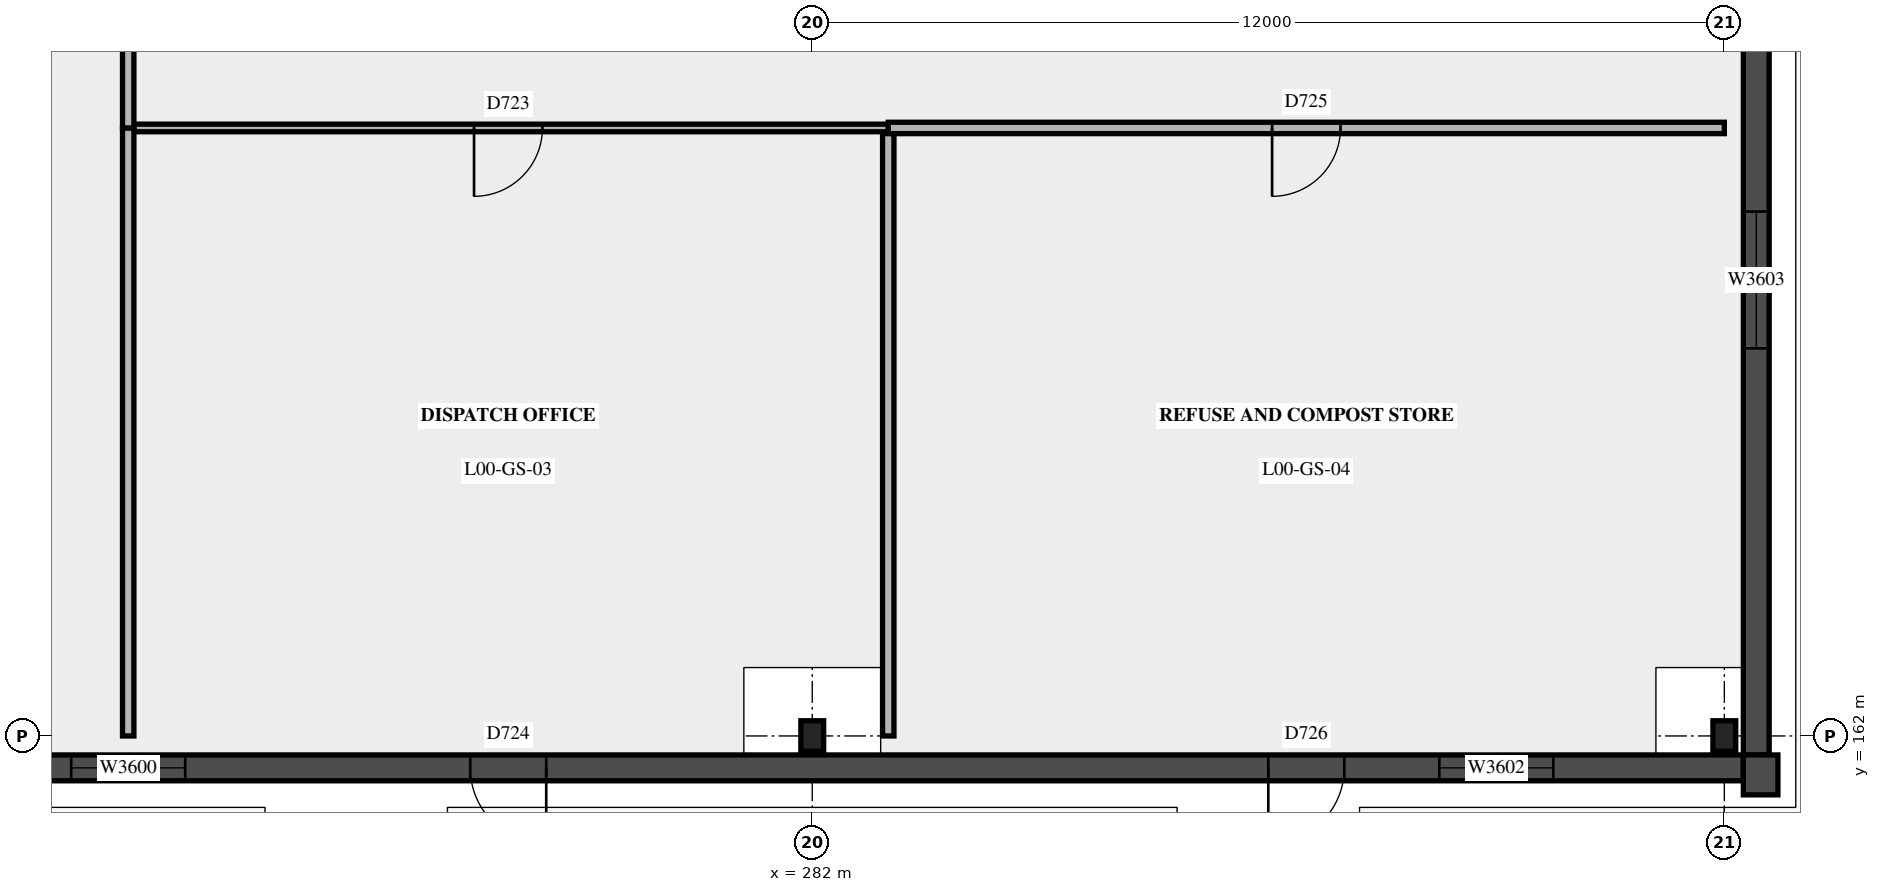
"""IFC4 building model, lengths in metres.
Left out: names, types, materials, properties, quantities, classifications, styles, units other than length and angle.
Written with IfcOpenShell. Run it as: python <this file> out.ifc"""

import sys

from ifc_helpers import new_model, si_unit, direction, frame, frame_2d, origin, origin_2d, place, context, subcontext, project, spatial, polyline, rectangle, i_section, outline, extrude, element, fill, save


model = new_model("IFC4")
c1 = context("Model", 3, precision=1e-05, world=origin(), true_north=direction((0.0, 1.0)))
c2 = subcontext(c1, "Body", "Model", "MODEL_VIEW")
j1 = project(units=[si_unit("LENGTHUNIT", "METRE"), si_unit("PLANEANGLEUNIT", "RADIAN")], contexts=[c1])
p1 = place(None, origin())
s1 = spatial("IfcSite", under=j1, at=p1, CompositionType="ELEMENT")
p2 = place(p1, origin())
s2 = spatial("IfcBuilding", under=s1, at=p2, CompositionType="ELEMENT")
p3 = place(p2, origin())
s3 = spatial("IfcBuildingStorey", under=s2, at=p3, CompositionType="ELEMENT", Elevation=0.0)
for number, where, z_axis, x_axis in (
    (1, (282.0, 162.0, 0.0), (0.0, 0.0, 1.0), (1.0, 0.0, 0.0)),
    (2, (294.0, 162.0, 0.0), (0.0, 0.0, 1.0), (1.0, 0.0, 0.0)),
):
    element("IfcColumn", number, at=place(p3, frame(where, z_axis=z_axis, x_axis=x_axis)), inside=s3, PredefinedType="COLUMN", context=c2, shape_type="SweptSolid", body=[
        extrude(i_section(OverallWidth=0.3, OverallDepth=0.4, WebThickness=0.013, FlangeThickness=0.024, at=origin_2d()), origin(), (0.0, 0.0, 1.0), 5.4),
    ])
p4 = place(p3, frame((221.75, 161.58, 0.0), z_axis=(0.0, 0.0, 1.0), x_axis=(1.0, 0.0, 0.0)))
e3 = element("IfcWall", 3, at=p4, inside=s3, PredefinedType="SOLIDWALL", context=c2, shape_type="SweptSolid", body=[
    extrude(rectangle(XDim=72.5, YDim=0.34, at=frame_2d((36.25, 0.0))), origin(), (0.0, 0.0, 1.0), 5.4),
])
p5 = place(p4, frame((0.155, 0.0, 4.61)))
e4 = element("IfcOpeningElement", 4, at=p5, cuts=e3, PredefinedType="OPENING", context=c2, shape_type="SweptSolid", body=[
    extrude(rectangle(XDim=0.19, YDim=0.38, at=frame_2d((0.095, 0.19))), frame((0.0, 0.18, 0.0), z_axis=(0.0, -1.0, 0.0), x_axis=(1.0, 0.0, 0.0)), (0.0, 0.0, 1.0), 0.36),
])
p6 = place(p4, frame((6.155, 0.0, 4.61)))
e5 = element("IfcOpeningElement", 5, at=p6, cuts=e3, PredefinedType="OPENING", context=c2, shape_type="SweptSolid", body=[
    extrude(rectangle(XDim=0.19, YDim=0.38, at=frame_2d((0.095, 0.19))), frame((0.0, 0.18, 0.0), z_axis=(0.0, -1.0, 0.0), x_axis=(1.0, 0.0, 0.0)), (0.0, 0.0, 1.0), 0.36),
])
p7 = place(p4, frame((12.155, 0.0, 4.61)))
e6 = element("IfcOpeningElement", 6, at=p7, cuts=e3, PredefinedType="OPENING", context=c2, shape_type="SweptSolid", body=[
    extrude(rectangle(XDim=0.19, YDim=0.38, at=frame_2d((0.095, 0.19))), frame((0.0, 0.18, 0.0), z_axis=(0.0, -1.0, 0.0), x_axis=(1.0, 0.0, 0.0)), (0.0, 0.0, 1.0), 0.36),
])
p8 = place(p4, frame((18.155, 0.0, 4.61)))
e7 = element("IfcOpeningElement", 7, at=p8, cuts=e3, PredefinedType="OPENING", context=c2, shape_type="SweptSolid", body=[
    extrude(rectangle(XDim=0.19, YDim=0.38, at=frame_2d((0.095, 0.19))), frame((0.0, 0.18, 0.0), z_axis=(0.0, -1.0, 0.0), x_axis=(1.0, 0.0, 0.0)), (0.0, 0.0, 1.0), 0.36),
])
p9 = place(p4, frame((24.155, 0.0, 4.61)))
e8 = element("IfcOpeningElement", 8, at=p9, cuts=e3, PredefinedType="OPENING", context=c2, shape_type="SweptSolid", body=[
    extrude(rectangle(XDim=0.19, YDim=0.38, at=frame_2d((0.095, 0.19))), frame((0.0, 0.18, 0.0), z_axis=(0.0, -1.0, 0.0), x_axis=(1.0, 0.0, 0.0)), (0.0, 0.0, 1.0), 0.36),
])
p10 = place(p4, frame((30.155, 0.0, 4.61)))
e9 = element("IfcOpeningElement", 9, at=p10, cuts=e3, PredefinedType="OPENING", context=c2, shape_type="SweptSolid", body=[
    extrude(rectangle(XDim=0.19, YDim=0.38, at=frame_2d((0.095, 0.19))), frame((0.0, 0.18, 0.0), z_axis=(0.0, -1.0, 0.0), x_axis=(1.0, 0.0, 0.0)), (0.0, 0.0, 1.0), 0.36),
])
p11 = place(p4, frame((36.155, 0.0, 4.61)))
e10 = element("IfcOpeningElement", 10, at=p11, cuts=e3, PredefinedType="OPENING", context=c2, shape_type="SweptSolid", body=[
    extrude(rectangle(XDim=0.19, YDim=0.38, at=frame_2d((0.095, 0.19))), frame((0.0, 0.18, 0.0), z_axis=(0.0, -1.0, 0.0), x_axis=(1.0, 0.0, 0.0)), (0.0, 0.0, 1.0), 0.36),
])
p12 = place(p4, frame((42.155, 0.0, 4.61)))
e11 = element("IfcOpeningElement", 11, at=p12, cuts=e3, PredefinedType="OPENING", context=c2, shape_type="SweptSolid", body=[
    extrude(rectangle(XDim=0.19, YDim=0.38, at=frame_2d((0.095, 0.19))), frame((0.0, 0.18, 0.0), z_axis=(0.0, -1.0, 0.0), x_axis=(1.0, 0.0, 0.0)), (0.0, 0.0, 1.0), 0.36),
])
p13 = place(p4, frame((48.155, 0.0, 4.61)))
e12 = element("IfcOpeningElement", 12, at=p13, cuts=e3, PredefinedType="OPENING", context=c2, shape_type="SweptSolid", body=[
    extrude(rectangle(XDim=0.19, YDim=0.38, at=frame_2d((0.095, 0.19))), frame((0.0, 0.18, 0.0), z_axis=(0.0, -1.0, 0.0), x_axis=(1.0, 0.0, 0.0)), (0.0, 0.0, 1.0), 0.36),
])
p14 = place(p4, frame((54.155, 0.0, 4.61)))
e13 = element("IfcOpeningElement", 13, at=p14, cuts=e3, PredefinedType="OPENING", context=c2, shape_type="SweptSolid", body=[
    extrude(rectangle(XDim=0.19, YDim=0.38, at=frame_2d((0.095, 0.19))), frame((0.0, 0.18, 0.0), z_axis=(0.0, -1.0, 0.0), x_axis=(1.0, 0.0, 0.0)), (0.0, 0.0, 1.0), 0.36),
])
p15 = place(p4, frame((60.155, 0.0, 4.61)))
e14 = element("IfcOpeningElement", 14, at=p15, cuts=e3, PredefinedType="OPENING", context=c2, shape_type="SweptSolid", body=[
    extrude(rectangle(XDim=0.19, YDim=0.38, at=frame_2d((0.095, 0.19))), frame((0.0, 0.18, 0.0), z_axis=(0.0, -1.0, 0.0), x_axis=(1.0, 0.0, 0.0)), (0.0, 0.0, 1.0), 0.36),
])
p16 = place(p4, frame((66.155, 0.0, 4.61)))
e15 = element("IfcOpeningElement", 15, at=p16, cuts=e3, PredefinedType="OPENING", context=c2, shape_type="SweptSolid", body=[
    extrude(rectangle(XDim=0.19, YDim=0.38, at=frame_2d((0.095, 0.19))), frame((0.0, 0.18, 0.0), z_axis=(0.0, -1.0, 0.0), x_axis=(1.0, 0.0, 0.0)), (0.0, 0.0, 1.0), 0.36),
])
p17 = place(p4, frame((72.155, 0.0, 4.61)))
e16 = element("IfcOpeningElement", 16, at=p17, cuts=e3, PredefinedType="OPENING", context=c2, shape_type="SweptSolid", body=[
    extrude(rectangle(XDim=0.19, YDim=0.38, at=frame_2d((0.095, 0.19))), frame((0.0, 0.18, 0.0), z_axis=(0.0, -1.0, 0.0), x_axis=(1.0, 0.0, 0.0)), (0.0, 0.0, 1.0), 0.36),
])
p18 = place(p4, frame((4.25, 0.0, 0.0)))
e17 = element("IfcOpeningElement", 17, at=p18, cuts=e3, PredefinedType="OPENING", context=c2, shape_type="SweptSolid", body=[
    extrude(rectangle(XDim=4.0, YDim=4.2, at=frame_2d((2.0, 2.1))), frame((0.0, 0.18, 0.0), z_axis=(0.0, -1.0, 0.0), x_axis=(1.0, 0.0, 0.0)), (0.0, 0.0, 1.0), 0.36),
])
p19 = place(p4, frame((16.25, 0.0, 0.0)))
e18 = element("IfcOpeningElement", 18, at=p19, cuts=e3, PredefinedType="OPENING", context=c2, shape_type="SweptSolid", body=[
    extrude(rectangle(XDim=4.0, YDim=4.2, at=frame_2d((2.0, 2.1))), frame((0.0, 0.18, 0.0), z_axis=(0.0, -1.0, 0.0), x_axis=(1.0, 0.0, 0.0)), (0.0, 0.0, 1.0), 0.36),
])
p20 = place(p4, frame((23.75, 0.0, 0.0), z_axis=(0.0, 0.0, 1.0), x_axis=(-1.0, 0.0, 0.0)))
e19 = element("IfcOpeningElement", 19, at=p20, cuts=e3, PredefinedType="OPENING", context=c2, shape_type="SweptSolid", body=[
    extrude(rectangle(XDim=1.0, YDim=2.1, at=frame_2d((0.5, 1.05))), frame((0.0, 0.18, 0.0), z_axis=(0.0, -1.0, 0.0), x_axis=(1.0, 0.0, 0.0)), (0.0, 0.0, 1.0), 0.36),
])
p21 = place(p4, frame((28.25, 0.0, 0.0)))
e20 = element("IfcOpeningElement", 20, at=p21, cuts=e3, PredefinedType="OPENING", context=c2, shape_type="SweptSolid", body=[
    extrude(rectangle(XDim=4.0, YDim=4.2, at=frame_2d((2.0, 2.1))), frame((0.0, 0.18, 0.0), z_axis=(0.0, -1.0, 0.0), x_axis=(1.0, 0.0, 0.0)), (0.0, 0.0, 1.0), 0.36),
])
p22 = place(p4, frame((40.25, 0.0, 0.0)))
e21 = element("IfcOpeningElement", 21, at=p22, cuts=e3, PredefinedType="OPENING", context=c2, shape_type="SweptSolid", body=[
    extrude(rectangle(XDim=4.0, YDim=4.2, at=frame_2d((2.0, 2.1))), frame((0.0, 0.18, 0.0), z_axis=(0.0, -1.0, 0.0), x_axis=(1.0, 0.0, 0.0)), (0.0, 0.0, 1.0), 0.36),
])
p23 = place(p4, frame((56.75, 0.0, 0.0), z_axis=(0.0, 0.0, 1.0), x_axis=(-1.0, 0.0, 0.0)))
e22 = element("IfcOpeningElement", 22, at=p23, cuts=e3, PredefinedType="OPENING", context=c2, shape_type="SweptSolid", body=[
    extrude(rectangle(XDim=1.0, YDim=2.1, at=frame_2d((0.5, 1.05))), frame((0.0, 0.18, 0.0), z_axis=(0.0, -1.0, 0.0), x_axis=(1.0, 0.0, 0.0)), (0.0, 0.0, 1.0), 0.36),
])
p24 = place(p4, frame((67.25, 0.0, 0.0), z_axis=(0.0, 0.0, 1.0), x_axis=(-1.0, 0.0, 0.0)))
e23 = element("IfcOpeningElement", 23, at=p24, cuts=e3, PredefinedType="OPENING", context=c2, shape_type="SweptSolid", body=[
    extrude(rectangle(XDim=1.0, YDim=2.1, at=frame_2d((0.5, 1.05))), frame((0.0, 0.18, 0.0), z_axis=(0.0, -1.0, 0.0), x_axis=(1.0, 0.0, 0.0)), (0.0, 0.0, 1.0), 0.36),
])
p25 = place(p4, frame((50.5, 0.0, 3.6)))
e24 = element("IfcOpeningElement", 24, at=p25, cuts=e3, PredefinedType="OPENING", context=c2, shape_type="SweptSolid", body=[
    extrude(rectangle(XDim=1.5, YDim=1.2, at=frame_2d((0.75, 0.6))), frame((0.0, 0.18, 0.0), z_axis=(0.0, -1.0, 0.0), x_axis=(1.0, 0.0, 0.0)), (0.0, 0.0, 1.0), 0.36),
])
p26 = place(p4, frame((68.5, 0.0, 3.6)))
e25 = element("IfcOpeningElement", 25, at=p26, cuts=e3, PredefinedType="OPENING", context=c2, shape_type="SweptSolid", body=[
    extrude(rectangle(XDim=1.5, YDim=1.2, at=frame_2d((0.75, 0.6))), frame((0.0, 0.18, 0.0), z_axis=(0.0, -1.0, 0.0), x_axis=(1.0, 0.0, 0.0)), (0.0, 0.0, 1.0), 0.36),
])
p27 = place(p3, frame((294.42, 161.75, 0.0), z_axis=(0.0, 0.0, 1.0), x_axis=(0.0, 1.0, 0.0)))
e26 = element("IfcWall", 26, at=p27, inside=s3, PredefinedType="SOLIDWALL", context=c2, shape_type="SweptSolid", body=[
    extrude(rectangle(XDim=24.5, YDim=0.34, at=frame_2d((12.25, 0.0))), origin(), (0.0, 0.0, 1.0), 5.4),
])
p28 = place(p27, frame((11.75, 0.0, 0.0), z_axis=(0.0, 0.0, 1.0), x_axis=(-1.0, 0.0, 0.0)))
e27 = element("IfcOpeningElement", 27, at=p28, cuts=e26, PredefinedType="OPENING", context=c2, shape_type="SweptSolid", body=[
    extrude(rectangle(XDim=1.0, YDim=2.1, at=frame_2d((0.5, 1.05))), frame((0.0, 0.18, 0.0), z_axis=(0.0, -1.0, 0.0), x_axis=(1.0, 0.0, 0.0)), (0.0, 0.0, 1.0), 0.36),
])
p29 = place(p27, frame((5.35, 0.0, 0.9)))
e28 = element("IfcOpeningElement", 28, at=p29, cuts=e26, PredefinedType="OPENING", context=c2, shape_type="SweptSolid", body=[
    extrude(rectangle(XDim=1.8, YDim=2.4, at=frame_2d((0.9, 1.2))), frame((0.0, 0.18, 0.0), z_axis=(0.0, -1.0, 0.0), x_axis=(1.0, 0.0, 0.0)), (0.0, 0.0, 1.0), 0.36),
])
p30 = place(p27, frame((17.35, 0.0, 0.9)))
e29 = element("IfcOpeningElement", 29, at=p30, cuts=e26, PredefinedType="OPENING", context=c2, shape_type="SweptSolid", body=[
    extrude(rectangle(XDim=1.8, YDim=2.4, at=frame_2d((0.9, 1.2))), frame((0.0, 0.18, 0.0), z_axis=(0.0, -1.0, 0.0), x_axis=(1.0, 0.0, 0.0)), (0.0, 0.0, 1.0), 0.36),
])
p31 = place(p3, frame((294.25, 161.488, 0.0), z_axis=(0.0, 0.0, 1.0), x_axis=(1.0, 0.0, 0.0)))
e30 = element("IfcWall", 30, at=p31, inside=s3, PredefinedType="SOLIDWALL", context=c2, shape_type="SweptSolid", body=[
    extrude(rectangle(XDim=0.455, YDim=0.525, at=frame_2d((0.228, 0.0))), origin(), (0.0, 0.0, 1.0), 5.01),
])
p32 = place(p3, frame((273.075, 170.0, 0.0), z_axis=(0.0, 0.0, 1.0), x_axis=(1.0, 0.0, 0.0)))
e31 = element("IfcWall", 31, at=p32, inside=s3, PredefinedType="PARTITIONING", context=c2, shape_type="SweptSolid", body=[
    extrude(rectangle(XDim=9.925, YDim=0.1, at=frame_2d((4.962, 0.0))), origin(), (0.0, 0.0, 1.0), 6.9),
])
p33 = place(p32, frame((4.475, 0.0, 0.0)))
e32 = element("IfcOpeningElement", 32, at=p33, cuts=e31, PredefinedType="OPENING", context=c2, shape_type="SweptSolid", body=[
    extrude(rectangle(XDim=0.9, YDim=2.1, at=frame_2d((0.45, 1.05))), frame((0.0, 0.06, 0.0), z_axis=(0.0, -1.0, 0.0), x_axis=(1.0, 0.0, 0.0)), (0.0, 0.0, 1.0), 0.12),
])
p34 = place(p3, frame((283.0, 170.0, 0.0), z_axis=(0.0, 0.0, 1.0), x_axis=(1.0, 0.0, 0.0)))
e33 = element("IfcWall", 33, at=p34, inside=s3, PredefinedType="PARTITIONING", context=c2, shape_type="SweptSolid", body=[
    extrude(rectangle(XDim=11.0, YDim=0.15, at=frame_2d((5.5, 0.0))), origin(), (0.0, 0.0, 1.0), 6.9),
])
p35 = place(p34, frame((5.05, 0.0, 0.0)))
e34 = element("IfcOpeningElement", 34, at=p35, cuts=e33, PredefinedType="OPENING", context=c2, shape_type="SweptSolid", body=[
    extrude(rectangle(XDim=0.9, YDim=2.1, at=frame_2d((0.45, 1.05))), frame((0.0, 0.085, 0.0), z_axis=(0.0, -1.0, 0.0), x_axis=(1.0, 0.0, 0.0)), (0.0, 0.0, 1.0), 0.17),
])
p36 = place(p3, frame((273.0, 162.0, 0.0), z_axis=(0.0, 0.0, 1.0), x_axis=(0.0, 1.0, 0.0)))
e35 = element("IfcWall", 35, at=p36, inside=s3, PredefinedType="PARTITIONING", context=c2, shape_type="SweptSolid", body=[
    extrude(outline(polyline([(0.0, 0.0), (8.0, 0.0), (8.0, 6.9), (0.09, 6.9), (0.085, 5.927), (0.0, 5.927), (0.0, 0.0)])), frame((0.0, 0.075, 0.0), z_axis=(0.0, -1.0, 0.0), x_axis=(1.0, 0.0, 0.0)), (0.0, 0.0, 1.0), 0.15),
])
p37 = place(p3, frame((273.0, 170.0, 0.0), z_axis=(0.0, 0.0, 1.0), x_axis=(0.0, 1.0, 0.0)))
e36 = element("IfcWall", 36, at=p37, inside=s3, PredefinedType="PARTITIONING", context=c2, shape_type="SweptSolid", body=[
    extrude(rectangle(XDim=6.0, YDim=0.15, at=frame_2d((3.0, 0.0))), origin(), (0.0, 0.0, 1.0), 6.9),
])
p38 = place(p37, frame((2.1, 0.0, 0.0)))
e37 = element("IfcOpeningElement", 37, at=p38, cuts=e36, PredefinedType="OPENING", context=c2, shape_type="SweptSolid", body=[
    extrude(rectangle(XDim=1.8, YDim=2.1, at=frame_2d((0.9, 1.05))), frame((0.0, 0.085, 0.0), z_axis=(0.0, -1.0, 0.0), x_axis=(1.0, 0.0, 0.0)), (0.0, 0.0, 1.0), 0.17),
])
p39 = place(p3, frame((283.0, 162.0, 0.0), z_axis=(0.0, 0.0, 1.0), x_axis=(0.0, 1.0, 0.0)))
e38 = element("IfcWall", 38, at=p39, inside=s3, PredefinedType="PARTITIONING", context=c2, shape_type="SweptSolid", body=[
    extrude(outline(polyline([(0.0, 0.0), (7.925, 0.0), (7.925, 6.9), (0.09, 6.9), (0.085, 5.927), (0.0, 5.927), (0.0, 0.0)])), frame((0.0, 0.075, 0.0), z_axis=(0.0, -1.0, 0.0), x_axis=(1.0, 0.0, 0.0)), (0.0, 0.0, 1.0), 0.15),
])
p40 = place(p23, origin())
e39 = element("IfcDoor", 39, at=p40, inside=s3, OperationType="SINGLE_SWING_LEFT", PredefinedType="DOOR", context=c2, shape_type="SweptSolid", body=[
    extrude(rectangle(XDim=1.0, YDim=2.1, at=frame_2d((0.5, 1.05))), frame((0.0, 0.025, 0.0), z_axis=(0.0, -1.0, 0.0), x_axis=(1.0, 0.0, 0.0)), (0.0, 0.0, 1.0), 0.05),
])
fill(e22, e39)
p41 = place(p24, origin())
e40 = element("IfcDoor", 40, at=p41, inside=s3, OperationType="SINGLE_SWING_RIGHT", PredefinedType="DOOR", context=c2, shape_type="SweptSolid", body=[
    extrude(rectangle(XDim=1.0, YDim=2.1, at=frame_2d((0.5, 1.05))), frame((0.0, 0.025, 0.0), z_axis=(0.0, -1.0, 0.0), x_axis=(1.0, 0.0, 0.0)), (0.0, 0.0, 1.0), 0.05),
])
fill(e23, e40)
p42 = place(p25, origin())
e41 = element("IfcWindow", 41, at=p42, inside=s3, PartitioningType="SINGLE_PANEL", PredefinedType="WINDOW", context=c2, shape_type="SweptSolid", body=[
    extrude(rectangle(XDim=1.5, YDim=1.2, at=frame_2d((0.75, 0.6))), frame((0.0, 0.03, 0.0), z_axis=(0.0, -1.0, 0.0), x_axis=(1.0, 0.0, 0.0)), (0.0, 0.0, 1.0), 0.06),
])
fill(e24, e41)
p43 = place(p26, origin())
e42 = element("IfcWindow", 42, at=p43, inside=s3, PartitioningType="SINGLE_PANEL", PredefinedType="WINDOW", context=c2, shape_type="SweptSolid", body=[
    extrude(rectangle(XDim=1.5, YDim=1.2, at=frame_2d((0.75, 0.6))), frame((0.0, 0.03, 0.0), z_axis=(0.0, -1.0, 0.0), x_axis=(1.0, 0.0, 0.0)), (0.0, 0.0, 1.0), 0.06),
])
fill(e25, e42)
p44 = place(p29, origin())
e43 = element("IfcWindow", 43, at=p44, inside=s3, PartitioningType="SINGLE_PANEL", PredefinedType="WINDOW", context=c2, shape_type="SweptSolid", body=[
    extrude(rectangle(XDim=1.8, YDim=2.4, at=frame_2d((0.9, 1.2))), frame((0.0, 0.03, 0.0), z_axis=(0.0, -1.0, 0.0), x_axis=(1.0, 0.0, 0.0)), (0.0, 0.0, 1.0), 0.06),
])
fill(e28, e43)
p45 = place(p33, origin())
e44 = element("IfcDoor", 44, at=p45, inside=s3, OperationType="SINGLE_SWING_RIGHT", PredefinedType="DOOR", context=c2, shape_type="SweptSolid", body=[
    extrude(rectangle(XDim=0.9, YDim=2.1, at=frame_2d((0.45, 1.05))), frame((0.0, 0.025, 0.0), z_axis=(0.0, -1.0, 0.0), x_axis=(1.0, 0.0, 0.0)), (0.0, 0.0, 1.0), 0.05),
])
fill(e32, e44)
p46 = place(p35, origin())
e45 = element("IfcDoor", 45, at=p46, inside=s3, OperationType="SINGLE_SWING_RIGHT", PredefinedType="DOOR", context=c2, shape_type="SweptSolid", body=[
    extrude(rectangle(XDim=0.9, YDim=2.1, at=frame_2d((0.45, 1.05))), frame((0.0, 0.025, 0.0), z_axis=(0.0, -1.0, 0.0), x_axis=(1.0, 0.0, 0.0)), (0.0, 0.0, 1.0), 0.05),
])
fill(e34, e45)
save(model, sys.argv[1])
